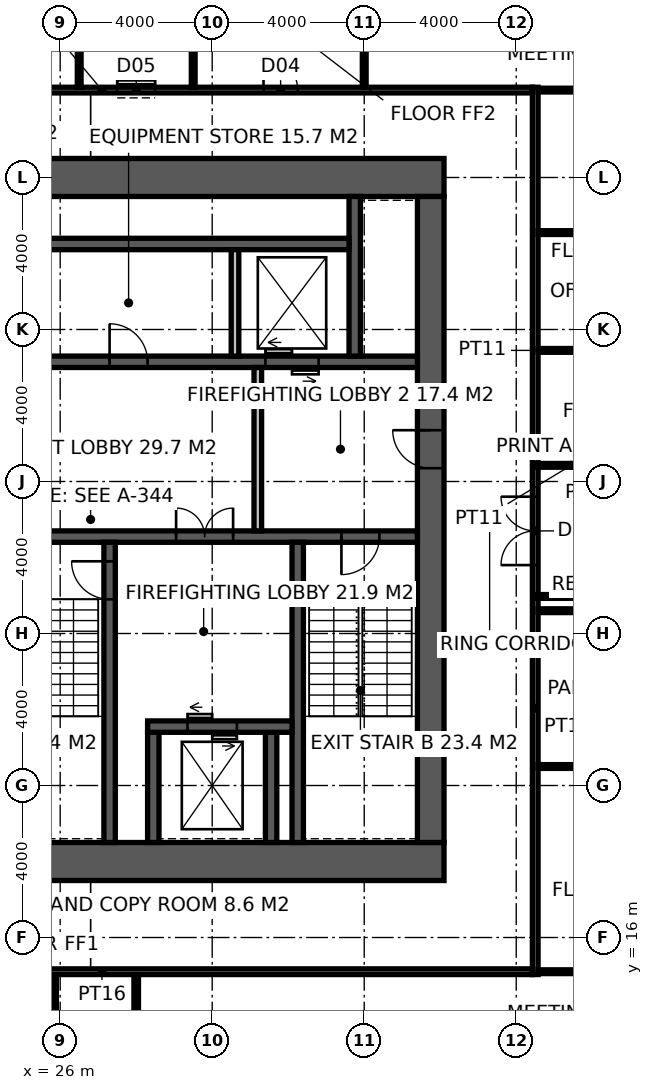
"""IFC4 building model, lengths in metres.
Left out: names, types, materials, properties, quantities, classifications, styles, units other than length and angle.
Written with IfcOpenShell. Run it as: python <this file> out.ifc"""

import sys

from ifc_helpers import new_model, si_unit, direction, frame, frame_2d, origin, place, context, subcontext, project, spatial, rectangle, extrude, element, fill, save


model = new_model("IFC4")
c1 = context("Model", 3, precision=1e-05, world=origin(), true_north=direction((0.0, 1.0)))
c2 = subcontext(c1, "Body", "Model", "MODEL_VIEW")
j1 = project(units=[si_unit("LENGTHUNIT", "METRE"), si_unit("PLANEANGLEUNIT", "RADIAN")], contexts=[c1])
p1 = place(None, origin())
s1 = spatial("IfcSite", under=j1, at=p1, CompositionType="ELEMENT")
p2 = place(p1, origin())
s2 = spatial("IfcBuilding", under=s1, at=p2, CompositionType="ELEMENT")
p3 = place(p2, frame((0.0, 0.0, 286.2)))
s3 = spatial("IfcBuildingStorey", under=s2, at=p3, CompositionType="ELEMENT", Elevation=286.2)
p4 = place(p3, frame((18.5, 18.0, -0.15), z_axis=(0.0, 0.0, 1.0), x_axis=(1.0, 0.0, 0.0)))
e1 = element("IfcWall", 1, at=p4, inside=s3, PredefinedType="SHEAR", context=c2, shape_type="SweptSolid", body=[
    extrude(rectangle(XDim=17.6, YDim=1.0, at=frame_2d((8.8, 0.0))), origin(), (0.0, 0.0, 1.0), 4.0),
])
p5 = place(p4, frame((3.45, 0.0, 0.15)))
e2 = element("IfcOpeningElement", 2, at=p5, cuts=e1, PredefinedType="OPENING", context=c2, shape_type="SweptSolid", body=[
    extrude(rectangle(XDim=1.5, YDim=2.4, at=frame_2d((0.75, 1.2))), frame((0.0, 0.51, 0.0), z_axis=(0.0, -1.0, 0.0), x_axis=(1.0, 0.0, 0.0)), (0.0, 0.0, 1.0), 1.02),
])
p6 = place(p3, frame((18.5, 36.0, -0.15), z_axis=(0.0, 0.0, 1.0), x_axis=(1.0, 0.0, 0.0)))
e3 = element("IfcWall", 3, at=p6, inside=s3, PredefinedType="SHEAR", context=c2, shape_type="SweptSolid", body=[
    extrude(rectangle(XDim=17.6, YDim=1.0, at=frame_2d((8.8, 0.0))), origin(), (0.0, 0.0, 1.0), 4.0),
])
p7 = place(p3, frame((35.75, 18.5, -0.15), z_axis=(0.0, 0.0, 1.0), x_axis=(0.0, 1.0, 0.0)))
e4 = element("IfcWall", 4, at=p7, inside=s3, PredefinedType="SHEAR", context=c2, shape_type="SweptSolid", body=[
    extrude(rectangle(XDim=17.0, YDim=0.7, at=frame_2d((8.5, 0.0))), origin(), (0.0, 0.0, 1.0), 4.0),
])
p8 = place(p7, frame((9.85, 0.0, 0.15)))
e5 = element("IfcOpeningElement", 5, at=p8, cuts=e4, PredefinedType="OPENING", context=c2, shape_type="SweptSolid", body=[
    extrude(rectangle(XDim=1.0, YDim=2.2, at=frame_2d((0.5, 1.1))), frame((0.0, 0.36, 0.0), z_axis=(0.0, -1.0, 0.0), x_axis=(1.0, 0.0, 0.0)), (0.0, 0.0, 1.0), 0.72),
])
p9 = place(p3, frame((24.15, 26.55, -0.15), z_axis=(0.0, 0.0, 1.0), x_axis=(1.0, 0.0, 0.0)))
e6 = element("IfcWall", 6, at=p9, inside=s3, PredefinedType="SHEAR", context=c2, shape_type="SweptSolid", body=[
    extrude(rectangle(XDim=11.25, YDim=0.3, at=frame_2d((5.625, 0.0))), origin(), (0.0, 0.0, 1.0), 4.0),
])
p10 = place(p9, frame((9.25, 0.0, 0.15)))
e7 = element("IfcOpeningElement", 7, at=p10, cuts=e6, PredefinedType="OPENING", context=c2, shape_type="SweptSolid", body=[
    extrude(rectangle(XDim=1.0, YDim=2.2, at=frame_2d((0.5, 1.1))), frame((0.0, 0.16, 0.0), z_axis=(0.0, -1.0, 0.0), x_axis=(1.0, 0.0, 0.0)), (0.0, 0.0, 1.0), 0.32),
])
p11 = place(p9, frame((4.9, 0.0, 0.15)))
e8 = element("IfcOpeningElement", 8, at=p11, cuts=e6, PredefinedType="OPENING", context=c2, shape_type="SweptSolid", body=[
    extrude(rectangle(XDim=1.5, YDim=2.4, at=frame_2d((0.75, 1.2))), frame((0.0, 0.16, 0.0), z_axis=(0.0, -1.0, 0.0), x_axis=(1.0, 0.0, 0.0)), (0.0, 0.0, 1.0), 0.32),
])
p12 = place(p3, frame((27.3, 18.5, -0.15), z_axis=(0.0, 0.0, 1.0), x_axis=(0.0, 1.0, 0.0)))
e9 = element("IfcWall", 9, at=p12, inside=s3, PredefinedType="SHEAR", context=c2, shape_type="SweptSolid", body=[
    extrude(rectangle(XDim=7.9, YDim=0.3, at=frame_2d((3.95, 0.0))), origin(), (0.0, 0.0, 1.0), 4.0),
])
p13 = place(p12, frame((6.4, 0.0, 0.15)))
e10 = element("IfcOpeningElement", 10, at=p13, cuts=e9, PredefinedType="OPENING", context=c2, shape_type="SweptSolid", body=[
    extrude(rectangle(XDim=1.0, YDim=2.2, at=frame_2d((0.5, 1.1))), frame((0.0, 0.16, 0.0), z_axis=(0.0, -1.0, 0.0), x_axis=(1.0, 0.0, 0.0)), (0.0, 0.0, 1.0), 0.32),
])
p14 = place(p3, frame((32.25, 18.5, -0.15), z_axis=(0.0, 0.0, 1.0), x_axis=(0.0, 1.0, 0.0)))
e11 = element("IfcWall", 11, at=p14, inside=s3, PredefinedType="SHEAR", context=c2, shape_type="SweptSolid", body=[
    extrude(rectangle(XDim=7.9, YDim=0.3, at=frame_2d((3.95, 0.0))), origin(), (0.0, 0.0, 1.0), 4.0),
])
for number, where, z_axis, x_axis in (
    (12, (28.45, 18.5, -0.15), (0.0, 0.0, 1.0), (0.0, 1.0, 0.0)),
    (13, (31.55, 18.5, -0.15), (0.0, 0.0, 1.0), (0.0, 1.0, 0.0)),
):
    element("IfcWall", number, at=place(p3, frame(where, z_axis=z_axis, x_axis=x_axis)), inside=s3, PredefinedType="SHEAR", context=c2, shape_type="SweptSolid", body=[
        extrude(rectangle(XDim=2.9, YDim=0.3, at=frame_2d((1.45, 0.0))), origin(), (0.0, 0.0, 1.0), 4.0),
    ])
p15 = place(p3, frame((28.3, 21.55, -0.15), z_axis=(0.0, 0.0, 1.0), x_axis=(1.0, 0.0, 0.0)))
e14 = element("IfcWall", 14, at=p15, inside=s3, PredefinedType="SHEAR", context=c2, shape_type="SweptSolid", body=[
    extrude(rectangle(XDim=3.8, YDim=0.3, at=frame_2d((1.9, 0.0))), origin(), (0.0, 0.0, 1.0), 4.0),
])
p16 = place(p15, frame((1.05, 0.0, 0.15)))
e15 = element("IfcOpeningElement", 15, at=p16, cuts=e14, PredefinedType="OPENING", context=c2, shape_type="SweptSolid", body=[
    extrude(rectangle(XDim=1.3, YDim=2.4, at=frame_2d((0.65, 1.2))), frame((0.0, 0.16, 0.0), z_axis=(0.0, -1.0, 0.0), x_axis=(1.0, 0.0, 0.0)), (0.0, 0.0, 1.0), 0.32),
])
p17 = place(p3, frame((24.15, 31.15, -0.15), z_axis=(0.0, 0.0, 1.0), x_axis=(1.0, 0.0, 0.0)))
e16 = element("IfcWall", 16, at=p17, inside=s3, PredefinedType="SHEAR", context=c2, shape_type="SweptSolid", body=[
    extrude(rectangle(XDim=11.25, YDim=0.3, at=frame_2d((5.625, 0.0))), origin(), (0.0, 0.0, 1.0), 4.0),
])
p18 = place(p17, frame((3.15, 0.0, 0.15)))
e17 = element("IfcOpeningElement", 17, at=p18, cuts=e16, PredefinedType="OPENING", context=c2, shape_type="SweptSolid", body=[
    extrude(rectangle(XDim=1.0, YDim=2.2, at=frame_2d((0.5, 1.1))), frame((0.0, 0.16, 0.0), z_axis=(0.0, -1.0, 0.0), x_axis=(1.0, 0.0, 0.0)), (0.0, 0.0, 1.0), 0.32),
])
p19 = place(p17, frame((7.25, 0.0, 0.15)))
e18 = element("IfcOpeningElement", 18, at=p19, cuts=e16, PredefinedType="OPENING", context=c2, shape_type="SweptSolid", body=[
    extrude(rectangle(XDim=1.4, YDim=2.4, at=frame_2d((0.7, 1.2))), frame((0.0, 0.16, 0.0), z_axis=(0.0, -1.0, 0.0), x_axis=(1.0, 0.0, 0.0)), (0.0, 0.0, 1.0), 0.32),
])
p20 = place(p3, frame((33.75, 31.3, -0.15), z_axis=(0.0, 0.0, 1.0), x_axis=(0.0, 1.0, 0.0)))
e19 = element("IfcWall", 19, at=p20, inside=s3, PredefinedType="SHEAR", context=c2, shape_type="SweptSolid", body=[
    extrude(rectangle(XDim=4.2, YDim=0.3, at=frame_2d((2.1, 0.0))), origin(), (0.0, 0.0, 1.0), 4.0),
])
p21 = place(p3, frame((25.0, 34.25, -0.15), z_axis=(0.0, 0.0, 1.0), x_axis=(1.0, 0.0, 0.0)))
e20 = element("IfcWall", 20, at=p21, inside=s3, PredefinedType="SHEAR", context=c2, shape_type="SweptSolid", body=[
    extrude(rectangle(XDim=8.6, YDim=0.3, at=frame_2d((4.3, 0.0))), origin(), (0.0, 0.0, 1.0), 4.0),
])
p22 = place(p3, frame((30.6, 31.3, -0.15), z_axis=(0.0, 0.0, 1.0), x_axis=(0.0, 1.0, 0.0)))
e21 = element("IfcWall", 21, at=p22, inside=s3, PredefinedType="SOLIDWALL", context=c2, shape_type="SweptSolid", body=[
    extrude(rectangle(XDim=2.8, YDim=0.2, at=frame_2d((1.4, 0.0))), origin(), (0.0, 0.0, 1.0), 4.0),
])
p23 = place(p3, frame((31.2, 26.7, 0.0), z_axis=(0.0, 0.0, 1.0), x_axis=(0.0, 1.0, 0.0)))
e22 = element("IfcWall", 22, at=p23, inside=s3, PredefinedType="SOLIDWALL", context=c2, shape_type="SweptSolid", body=[
    extrude(rectangle(XDim=4.3, YDim=0.2, at=frame_2d((2.15, 0.0))), origin(), (0.0, 0.0, 1.0), 3.85),
])
p24 = place(p3, frame((38.5, 15.025, 0.0), z_axis=(0.0, 0.0, 1.0), x_axis=(0.0, 1.0, 0.0)))
e23 = element("IfcWall", 23, at=p24, inside=s3, PredefinedType="PARTITIONING", context=c2, shape_type="SweptSolid", body=[
    extrude(rectangle(XDim=23.35, YDim=0.15, at=frame_2d((11.675, 0.0))), origin(), (0.0, 0.0, 1.0), 3.85),
])
p25 = place(p24, frame((10.775, 0.0, 0.0)))
e24 = element("IfcOpeningElement", 24, at=p25, cuts=e23, PredefinedType="OPENING", context=c2, shape_type="SweptSolid", body=[
    extrude(rectangle(XDim=1.8, YDim=2.4, at=frame_2d((0.9, 1.2))), frame((0.0, 0.085, 0.0), z_axis=(0.0, -1.0, 0.0), x_axis=(1.0, 0.0, 0.0)), (0.0, 0.0, 1.0), 0.17),
])
p26 = place(p3, frame((15.775, 15.1, 0.0), z_axis=(0.0, 0.0, 1.0), x_axis=(1.0, 0.0, 0.0)))
e25 = element("IfcWall", 25, at=p26, inside=s3, PredefinedType="PARTITIONING", context=c2, shape_type="SweptSolid", body=[
    extrude(rectangle(XDim=22.65, YDim=0.15, at=frame_2d((11.325, 0.0))), origin(), (0.0, 0.0, 1.0), 3.85),
])
p27 = place(p3, frame((15.775, 38.3, 0.0), z_axis=(0.0, 0.0, 1.0), x_axis=(1.0, 0.0, 0.0)))
e26 = element("IfcWall", 26, at=p27, inside=s3, PredefinedType="PARTITIONING", context=c2, shape_type="SweptSolid", body=[
    extrude(rectangle(XDim=22.65, YDim=0.15, at=frame_2d((11.325, 0.0))), origin(), (0.0, 0.0, 1.0), 3.85),
])
p28 = place(p27, frame((7.975, 0.0, 0.0)))
e27 = element("IfcOpeningElement", 27, at=p28, cuts=e26, PredefinedType="OPENING", context=c2, shape_type="SweptSolid", body=[
    extrude(rectangle(XDim=0.9, YDim=2.1, at=frame_2d((0.45, 1.05))), frame((0.0, 0.085, 0.0), z_axis=(0.0, -1.0, 0.0), x_axis=(1.0, 0.0, 0.0)), (0.0, 0.0, 1.0), 0.17),
])
p29 = place(p27, frame((11.725, 0.0, 0.0)))
e28 = element("IfcOpeningElement", 28, at=p29, cuts=e26, PredefinedType="OPENING", context=c2, shape_type="SweptSolid", body=[
    extrude(rectangle(XDim=1.0, YDim=2.1, at=frame_2d((0.5, 1.05))), frame((0.0, 0.085, 0.0), z_axis=(0.0, -1.0, 0.0), x_axis=(1.0, 0.0, 0.0)), (0.0, 0.0, 1.0), 0.17),
])
p30 = place(p27, frame((15.575, 0.0, 0.0)))
e29 = element("IfcOpeningElement", 29, at=p30, cuts=e26, PredefinedType="OPENING", context=c2, shape_type="SweptSolid", body=[
    extrude(rectangle(XDim=0.9, YDim=2.1, at=frame_2d((0.45, 1.05))), frame((0.0, 0.085, 0.0), z_axis=(0.0, -1.0, 0.0), x_axis=(1.0, 0.0, 0.0)), (0.0, 0.0, 1.0), 0.17),
])
p31 = place(p3, frame((34.0, 38.375, 0.0), z_axis=(0.0, 0.0, 1.0), x_axis=(0.0, 1.0, 0.0)))
e30 = element("IfcWall", 30, at=p31, inside=s3, PredefinedType="PARTITIONING", context=c2, shape_type="SweptSolid", body=[
    extrude(rectangle(XDim=3.675, YDim=0.1, at=frame_2d((1.837, 0.0))), origin(), (0.0, 0.0, 1.0), 2.95),
])
for number, where, z_axis, x_axis in (
    (31, (26.5, 38.375, 0.0), (0.0, 0.0, 1.0), (0.0, 1.0, 0.0)),
    (32, (29.5, 38.375, 0.0), (0.0, 0.0, 1.0), (0.0, 1.0, 0.0)),
):
    element("IfcWall", number, at=place(p3, frame(where, z_axis=z_axis, x_axis=x_axis)), inside=s3, PredefinedType="PARTITIONING", context=c2, shape_type="SweptSolid", body=[
        extrude(rectangle(XDim=3.575, YDim=0.1, at=frame_2d((1.788, 0.0))), origin(), (0.0, 0.0, 1.0), 3.85),
    ])
p32 = place(p3, frame((28.0, 4.3, 0.0), z_axis=(0.0, 0.0, 1.0), x_axis=(0.0, 1.0, 0.0)))
e33 = element("IfcWall", 33, at=p32, inside=s3, PredefinedType="PARTITIONING", context=c2, shape_type="SweptSolid", body=[
    extrude(rectangle(XDim=10.725, YDim=0.12, at=frame_2d((5.362, 0.0))), origin(), (0.0, 0.0, 1.0), 3.85),
])
p33 = place(p3, frame((38.575, 15.1, 0.0), z_axis=(0.0, 0.0, 1.0), x_axis=(1.0, 0.0, 0.0)))
e34 = element("IfcWall", 34, at=p33, inside=s3, PredefinedType="PARTITIONING", context=c2, shape_type="SweptSolid", body=[
    extrude(rectangle(XDim=4.775, YDim=0.1, at=frame_2d((2.388, 0.0))), origin(), (0.0, 0.0, 1.0), 3.85),
])
p34 = place(p3, frame((38.575, 20.5, 0.0), z_axis=(0.0, 0.0, 1.0), x_axis=(1.0, 0.0, 0.0)))
e35 = element("IfcWall", 35, at=p34, inside=s3, PredefinedType="PARTITIONING", context=c2, shape_type="SweptSolid", body=[
    extrude(rectangle(XDim=4.675, YDim=0.1, at=frame_2d((2.337, 0.0))), origin(), (0.0, 0.0, 1.0), 3.85),
])
for number, where, z_axis, x_axis in (
    (36, (38.575, 24.6, 0.0), (0.0, 0.0, 1.0), (1.0, 0.0, 0.0)),
    (37, (38.575, 28.8, 0.0), (0.0, 0.0, 1.0), (1.0, 0.0, 0.0)),
):
    element("IfcWall", number, at=place(p3, frame(where, z_axis=z_axis, x_axis=x_axis)), inside=s3, PredefinedType="PARTITIONING", context=c2, shape_type="SweptSolid", body=[
        extrude(rectangle(XDim=4.775, YDim=0.1, at=frame_2d((2.388, 0.0))), origin(), (0.0, 0.0, 1.0), 3.85),
    ])
for number, where, z_axis, x_axis in (
    (38, (38.575, 31.45, 0.0), (0.0, 0.0, 1.0), (1.0, 0.0, 0.0)),
    (39, (38.575, 34.55, 0.0), (0.0, 0.0, 1.0), (1.0, 0.0, 0.0)),
):
    element("IfcWall", number, at=place(p3, frame(where, z_axis=z_axis, x_axis=x_axis)), inside=s3, PredefinedType="PARTITIONING", context=c2, shape_type="SweptSolid", body=[
        extrude(rectangle(XDim=4.675, YDim=0.1, at=frame_2d((2.337, 0.0))), origin(), (0.0, 0.0, 1.0), 3.85),
    ])
p35 = place(p3, frame((38.575, 38.3, 0.0), z_axis=(0.0, 0.0, 1.0), x_axis=(1.0, 0.0, 0.0)))
e40 = element("IfcWall", 40, at=p35, inside=s3, PredefinedType="PARTITIONING", context=c2, shape_type="SweptSolid", body=[
    extrude(rectangle(XDim=4.775, YDim=0.1, at=frame_2d((2.388, 0.0))), origin(), (0.0, 0.0, 1.0), 3.85),
])
p36 = place(p3, frame((25.85, 11.55, 0.0), z_axis=(0.0, 0.0, 1.0), x_axis=(0.0, 1.0, 0.0)))
e41 = element("IfcWall", 41, at=p36, inside=s3, PredefinedType="PARTITIONING", context=c2, shape_type="SweptSolid", body=[
    extrude(rectangle(XDim=3.475, YDim=0.1, at=frame_2d((1.737, 0.0))), origin(), (0.0, 0.0, 1.0), 2.95),
])
for number, where, z_axis, x_axis in (
    (42, (38.5, 24.975, 0.0), (0.0, 0.0, 1.0), (1.0, 0.0, 0.0)),
    (43, (41.65, 28.425, 0.0), (0.0, 0.0, 1.0), (-1.0, 0.0, 0.0)),
):
    element("IfcWall", number, at=place(p3, frame(where, z_axis=z_axis, x_axis=x_axis)), inside=s3, PredefinedType="PARTITIONING", context=c2, shape_type="SweptSolid", body=[
        extrude(rectangle(XDim=3.15, YDim=0.1, at=frame_2d((1.575, 0.0))), origin(), (0.0, 0.0, 1.0), 3.85),
    ])
p37 = place(p13, origin())
e44 = element("IfcDoor", 44, at=p37, inside=s3, OperationType="SINGLE_SWING_RIGHT", PredefinedType="DOOR", context=c2, shape_type="SweptSolid", body=[
    extrude(rectangle(XDim=1.0, YDim=2.2, at=frame_2d((0.5, 1.1))), frame((0.0, 0.025, 0.0), z_axis=(0.0, -1.0, 0.0), x_axis=(1.0, 0.0, 0.0)), (0.0, 0.0, 1.0), 0.05),
])
fill(e10, e44)
p38 = place(p10, frame((1.0, 0.0, 0.0), z_axis=(0.0, 0.0, 1.0), x_axis=(-1.0, 0.0, 0.0)))
e45 = element("IfcDoor", 45, at=p38, inside=s3, OperationType="SINGLE_SWING_RIGHT", PredefinedType="DOOR", context=c2, shape_type="SweptSolid", body=[
    extrude(rectangle(XDim=1.0, YDim=2.2, at=frame_2d((0.5, 1.1))), frame((0.0, 0.025, 0.0), z_axis=(0.0, -1.0, 0.0), x_axis=(1.0, 0.0, 0.0)), (0.0, 0.0, 1.0), 0.05),
])
fill(e7, e45)
p39 = place(p8, origin())
e46 = element("IfcDoor", 46, at=p39, inside=s3, OperationType="SINGLE_SWING_RIGHT", PredefinedType="DOOR", context=c2, shape_type="SweptSolid", body=[
    extrude(rectangle(XDim=1.0, YDim=2.2, at=frame_2d((0.5, 1.1))), frame((0.0, 0.025, 0.0), z_axis=(0.0, -1.0, 0.0), x_axis=(1.0, 0.0, 0.0)), (0.0, 0.0, 1.0), 0.05),
])
fill(e5, e46)
p40 = place(p11, origin())
e47 = element("IfcDoor", 47, at=p40, inside=s3, OperationType="DOUBLE_DOOR_DOUBLE_SWING", PredefinedType="DOOR", context=c2, shape_type="SweptSolid", body=[
    extrude(rectangle(XDim=1.5, YDim=2.4, at=frame_2d((0.75, 1.2))), frame((0.0, 0.025, 0.0), z_axis=(0.0, -1.0, 0.0), x_axis=(1.0, 0.0, 0.0)), (0.0, 0.0, 1.0), 0.05),
])
fill(e8, e47)
p41 = place(p18, origin())
e48 = element("IfcDoor", 48, at=p41, inside=s3, OperationType="SINGLE_SWING_LEFT", PredefinedType="DOOR", context=c2, shape_type="SweptSolid", body=[
    extrude(rectangle(XDim=1.0, YDim=2.2, at=frame_2d((0.5, 1.1))), frame((0.0, 0.025, 0.0), z_axis=(0.0, -1.0, 0.0), x_axis=(1.0, 0.0, 0.0)), (0.0, 0.0, 1.0), 0.05),
])
fill(e17, e48)
p42 = place(p29, origin())
e49 = element("IfcDoor", 49, at=p42, inside=s3, OperationType="SLIDING_TO_LEFT", PredefinedType="DOOR", context=c2, shape_type="SweptSolid", body=[
    extrude(rectangle(XDim=1.0, YDim=2.1, at=frame_2d((0.5, 1.05))), frame((0.0, 0.025, 0.0), z_axis=(0.0, -1.0, 0.0), x_axis=(1.0, 0.0, 0.0)), (0.0, 0.0, 1.0), 0.05),
])
fill(e28, e49)
p43 = place(p30, origin())
e50 = element("IfcDoor", 50, at=p43, inside=s3, OperationType="SINGLE_SWING_LEFT", PredefinedType="DOOR", context=c2, shape_type="SweptSolid", body=[
    extrude(rectangle(XDim=0.9, YDim=2.1, at=frame_2d((0.45, 1.05))), frame((0.0, 0.025, 0.0), z_axis=(0.0, -1.0, 0.0), x_axis=(1.0, 0.0, 0.0)), (0.0, 0.0, 1.0), 0.05),
])
fill(e29, e50)
p44 = place(p25, origin())
e51 = element("IfcDoor", 51, at=p44, inside=s3, OperationType="DOUBLE_DOOR_DOUBLE_SWING", PredefinedType="DOOR", context=c2, shape_type="SweptSolid", body=[
    extrude(rectangle(XDim=1.8, YDim=2.4, at=frame_2d((0.9, 1.2))), frame((0.0, 0.025, 0.0), z_axis=(0.0, -1.0, 0.0), x_axis=(1.0, 0.0, 0.0)), (0.0, 0.0, 1.0), 0.05),
])
fill(e24, e51)
p45 = place(p16, origin())
e52 = element("IfcDoor", 52, at=p45, inside=s3, OperationType="DOUBLE_DOOR_SLIDING", PredefinedType="DOOR", context=c2, shape_type="SweptSolid", body=[
    extrude(rectangle(XDim=1.3, YDim=2.4, at=frame_2d((0.65, 1.2))), frame((0.0, 0.025, 0.0), z_axis=(0.0, -1.0, 0.0), x_axis=(1.0, 0.0, 0.0)), (0.0, 0.0, 1.0), 0.05),
])
fill(e15, e52)
p46 = place(p19, origin())
e53 = element("IfcDoor", 53, at=p46, inside=s3, OperationType="DOUBLE_DOOR_SLIDING", PredefinedType="DOOR", context=c2, shape_type="SweptSolid", body=[
    extrude(rectangle(XDim=1.4, YDim=2.4, at=frame_2d((0.7, 1.2))), frame((0.0, 0.025, 0.0), z_axis=(0.0, -1.0, 0.0), x_axis=(1.0, 0.0, 0.0)), (0.0, 0.0, 1.0), 0.05),
])
fill(e18, e53)
save(model, sys.argv[1])
